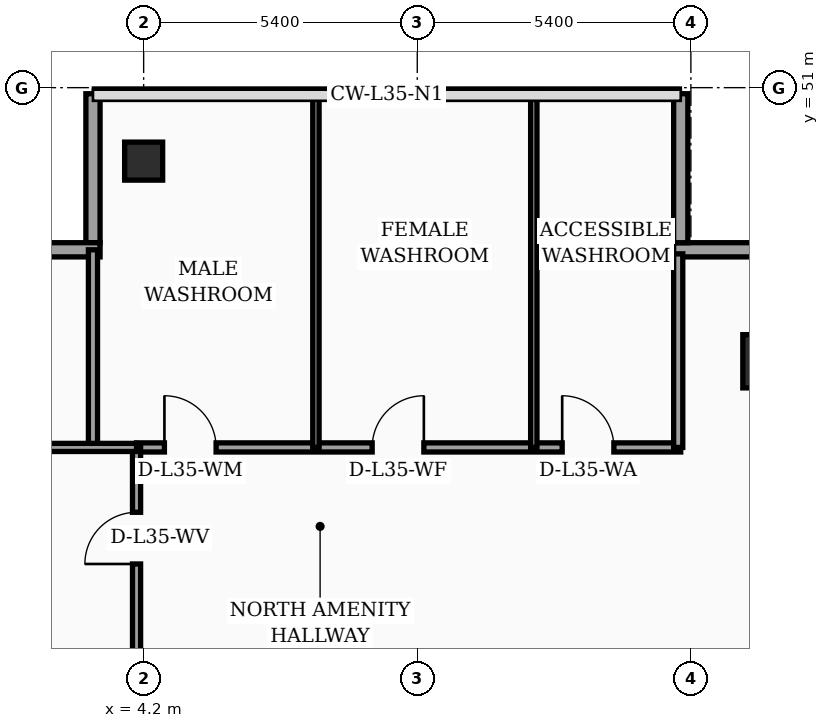
"""IFC4 building model, lengths in metres.
Left out: names, types, materials, properties, quantities, classifications, styles, units other than length and angle.
Written with IfcOpenShell. Run it as: python <this file> out.ifc"""

import sys

from ifc_helpers import new_model, si_unit, direction, frame, frame_2d, origin, origin_2d, place, context, subcontext, project, spatial, rectangle, hollow_rectangle, extrude, element, fill, save


model = new_model("IFC4")
c1 = context("Model", 3, precision=1e-05, world=origin(), true_north=direction((0.0, 1.0)))
c2 = subcontext(c1, "Body", "Model", "MODEL_VIEW")
j1 = project(units=[si_unit("LENGTHUNIT", "METRE"), si_unit("PLANEANGLEUNIT", "RADIAN")], contexts=[c1])
p1 = place(None, origin())
s1 = spatial("IfcSite", under=j1, at=p1, CompositionType="ELEMENT")
p2 = place(p1, origin())
s2 = spatial("IfcBuilding", under=s1, at=p2, CompositionType="ELEMENT")
p3 = place(p2, frame((0.0, 0.0, 144.0)))
s3 = spatial("IfcBuildingStorey", under=s2, at=p3, CompositionType="ELEMENT", Elevation=144.0)
p4 = place(p3, frame((4.2, 49.55, 0.0), z_axis=(0.0, 0.0, 1.0), x_axis=(1.0, 0.0, 0.0)))
e1 = element("IfcColumn", 1, at=p4, inside=s3, PredefinedType="COLUMN", context=c2, shape_type="SweptSolid", body=[
    extrude(hollow_rectangle(XDim=0.75, YDim=0.75, WallThickness=0.032, at=origin_2d()), origin(), (0.0, 0.0, 1.0), 4.26),
])
p5 = place(p3, frame((16.55, 45.6, 0.0), z_axis=(0.0, 0.0, 1.0), x_axis=(1.0, 0.0, 0.0)))
e2 = element("IfcColumn", 2, at=p5, inside=s3, PredefinedType="COLUMN", context=c2, shape_type="SweptSolid", body=[
    extrude(rectangle(XDim=1.05, YDim=1.05, at=origin_2d()), origin(), (0.0, 0.0, 1.0), 4.26),
])
p6 = place(p3, frame((17.9, 47.8, 0.0), z_axis=(0.0, 0.0, 1.0), x_axis=(-1.0, 0.0, 0.0)))
e3 = element("IfcWall", 3, at=p6, inside=s3, PredefinedType="SOLIDWALL", context=c2, shape_type="SweptSolid", body=[
    extrude(rectangle(XDim=3.24, YDim=0.28, at=frame_2d((1.62, 0.0))), origin(), (0.0, 0.0, 1.0), 4.26),
])
p7 = place(p3, frame((14.8, 47.94, 0.0), z_axis=(0.0, 0.0, 1.0), x_axis=(0.0, 1.0, 0.0)))
e4 = element("IfcWall", 4, at=p7, inside=s3, PredefinedType="SOLIDWALL", context=c2, shape_type="SweptSolid", body=[
    extrude(rectangle(XDim=2.94, YDim=0.28, at=frame_2d((1.47, 0.0))), origin(), (0.0, 0.0, 1.0), 4.26),
])
p8 = place(p3, frame((3.2, 50.88, 0.0), z_axis=(0.0, 0.0, 1.0), x_axis=(0.0, -1.0, 0.0)))
e5 = element("IfcWall", 5, at=p8, inside=s3, PredefinedType="SOLIDWALL", context=c2, shape_type="SweptSolid", body=[
    extrude(rectangle(XDim=2.94, YDim=0.28, at=frame_2d((1.47, 0.0))), origin(), (0.0, 0.0, 1.0), 3.74),
])
p9 = place(p3, frame((3.34, 47.8, 0.0), z_axis=(0.0, 0.0, 1.0), x_axis=(-1.0, 0.0, 0.0)))
e6 = element("IfcWall", 6, at=p9, inside=s3, PredefinedType="SOLIDWALL", context=c2, shape_type="SweptSolid", body=[
    extrude(rectangle(XDim=3.22, YDim=0.28, at=frame_2d((1.61, 0.0))), origin(), (0.0, 0.0, 1.0), 3.74),
])
p10 = place(p3, frame((3.2, 43.9, 0.0), z_axis=(0.0, 0.0, 1.0), x_axis=(0.0, 1.0, 0.0)))
e7 = element("IfcWall", 7, at=p10, inside=s3, PredefinedType="PARTITIONING", context=c2, shape_type="SweptSolid", body=[
    extrude(rectangle(XDim=3.9, YDim=0.18, at=frame_2d((1.95, 0.0))), origin(), (0.0, 0.0, 1.0), 4.26),
])
p11 = place(p3, frame((4.06, 43.9, 0.0), z_axis=(0.0, 0.0, 1.0), x_axis=(1.0, 0.0, 0.0)))
e8 = element("IfcWall", 8, at=p11, inside=s3, PredefinedType="PARTITIONING", context=c2, shape_type="SweptSolid", body=[
    extrude(rectangle(XDim=10.74, YDim=0.18, at=frame_2d((5.37, 0.0))), origin(), (0.0, 0.0, 1.0), 3.64),
])
p12 = place(p11, frame((0.55, 0.0, 0.0)))
e9 = element("IfcOpeningElement", 9, at=p12, cuts=e8, PredefinedType="OPENING", context=c2, shape_type="SweptSolid", body=[
    extrude(rectangle(XDim=1.02, YDim=2.2, at=frame_2d((0.51, 1.1))), frame((0.0, 0.1, 0.0), z_axis=(0.0, -1.0, 0.0), x_axis=(1.0, 0.0, 0.0)), (0.0, 0.0, 1.0), 0.2),
])
p13 = place(p11, frame((4.65, 0.0, 0.0)))
e10 = element("IfcOpeningElement", 10, at=p13, cuts=e8, PredefinedType="OPENING", context=c2, shape_type="SweptSolid", body=[
    extrude(rectangle(XDim=1.02, YDim=2.2, at=frame_2d((0.51, 1.1))), frame((0.0, 0.1, 0.0), z_axis=(0.0, -1.0, 0.0), x_axis=(1.0, 0.0, 0.0)), (0.0, 0.0, 1.0), 0.2),
])
p14 = place(p11, frame((8.4, 0.0, 0.0)))
e11 = element("IfcOpeningElement", 11, at=p14, cuts=e8, PredefinedType="OPENING", context=c2, shape_type="SweptSolid", body=[
    extrude(rectangle(XDim=1.02, YDim=2.2, at=frame_2d((0.51, 1.1))), frame((0.0, 0.1, 0.0), z_axis=(0.0, -1.0, 0.0), x_axis=(1.0, 0.0, 0.0)), (0.0, 0.0, 1.0), 0.2),
])
p15 = place(p3, frame((4.06, 38.4, 0.0), z_axis=(0.0, 0.0, 1.0), x_axis=(0.0, 1.0, 0.0)))
e12 = element("IfcWall", 12, at=p15, inside=s3, PredefinedType="PARTITIONING", context=c2, shape_type="SweptSolid", body=[
    extrude(rectangle(XDim=5.5, YDim=0.16, at=frame_2d((2.75, 0.0))), origin(), (0.0, 0.0, 1.0), 3.64),
])
p16 = place(p15, frame((3.2, 0.0, 0.0)))
e13 = element("IfcOpeningElement", 13, at=p16, cuts=e12, PredefinedType="OPENING", context=c2, shape_type="SweptSolid", body=[
    extrude(rectangle(XDim=1.02, YDim=2.2, at=frame_2d((0.51, 1.1))), frame((0.0, 0.09, 0.0), z_axis=(0.0, -1.0, 0.0), x_axis=(1.0, 0.0, 0.0)), (0.0, 0.0, 1.0), 0.18),
])
p17 = place(p3, frame((0.08, 43.9, 0.0), z_axis=(0.0, 0.0, 1.0), x_axis=(1.0, 0.0, 0.0)))
e14 = element("IfcWall", 14, at=p17, inside=s3, PredefinedType="PARTITIONING", context=c2, shape_type="SweptSolid", body=[
    extrude(rectangle(XDim=3.98, YDim=0.16, at=frame_2d((1.99, 0.0))), origin(), (0.0, 0.0, 1.0), 3.64),
])
p18 = place(p3, frame((14.75, 43.9, 0.0), z_axis=(0.0, 0.0, 1.0), x_axis=(0.0, 1.0, 0.0)))
e15 = element("IfcWall", 15, at=p18, inside=s3, PredefinedType="PARTITIONING", context=c2, shape_type="SweptSolid", body=[
    extrude(rectangle(XDim=3.82, YDim=0.18, at=frame_2d((1.91, 0.0))), origin(), (0.0, 0.0, 1.0), 3.74),
])
for number, where, z_axis, x_axis in (
    (16, (7.6, 43.9, 0.0), (0.0, 0.0, 1.0), (0.0, 1.0, 0.0)),
    (17, (11.9, 43.9, 0.0), (0.0, 0.0, 1.0), (0.0, 1.0, 0.0)),
):
    element("IfcWall", number, at=place(p3, frame(where, z_axis=z_axis, x_axis=x_axis)), inside=s3, PredefinedType="PARTITIONING", context=c2, shape_type="SweptSolid", body=[
        extrude(rectangle(XDim=7.04, YDim=0.125, at=frame_2d((3.52, 0.0))), origin(), (0.0, 0.0, 1.0), 3.74),
    ])
p19 = place(p12, origin())
e18 = element("IfcDoor", 18, at=p19, inside=s3, OperationType="SINGLE_SWING_LEFT", PredefinedType="DOOR", context=c2, shape_type="SweptSolid", body=[
    extrude(rectangle(XDim=1.02, YDim=2.2, at=frame_2d((0.51, 1.1))), frame((0.0, 0.025, 0.0), z_axis=(0.0, -1.0, 0.0), x_axis=(1.0, 0.0, 0.0)), (0.0, 0.0, 1.0), 0.05),
])
fill(e9, e18)
p20 = place(p13, origin())
e19 = element("IfcDoor", 19, at=p20, inside=s3, OperationType="SINGLE_SWING_RIGHT", PredefinedType="DOOR", context=c2, shape_type="SweptSolid", body=[
    extrude(rectangle(XDim=1.02, YDim=2.2, at=frame_2d((0.51, 1.1))), frame((0.0, 0.025, 0.0), z_axis=(0.0, -1.0, 0.0), x_axis=(1.0, 0.0, 0.0)), (0.0, 0.0, 1.0), 0.05),
])
fill(e10, e19)
p21 = place(p14, origin())
e20 = element("IfcDoor", 20, at=p21, inside=s3, OperationType="SINGLE_SWING_LEFT", PredefinedType="DOOR", context=c2, shape_type="SweptSolid", body=[
    extrude(rectangle(XDim=1.02, YDim=2.2, at=frame_2d((0.51, 1.1))), frame((0.0, 0.025, 0.0), z_axis=(0.0, -1.0, 0.0), x_axis=(1.0, 0.0, 0.0)), (0.0, 0.0, 1.0), 0.05),
])
fill(e11, e20)
p22 = place(p16, origin())
e21 = element("IfcDoor", 21, at=p22, inside=s3, OperationType="SINGLE_SWING_LEFT", PredefinedType="DOOR", context=c2, shape_type="SweptSolid", body=[
    extrude(rectangle(XDim=1.02, YDim=2.2, at=frame_2d((0.51, 1.1))), frame((0.0, 0.025, 0.0), z_axis=(0.0, -1.0, 0.0), x_axis=(1.0, 0.0, 0.0)), (0.0, 0.0, 1.0), 0.05),
])
fill(e13, e21)
save(model, sys.argv[1])
